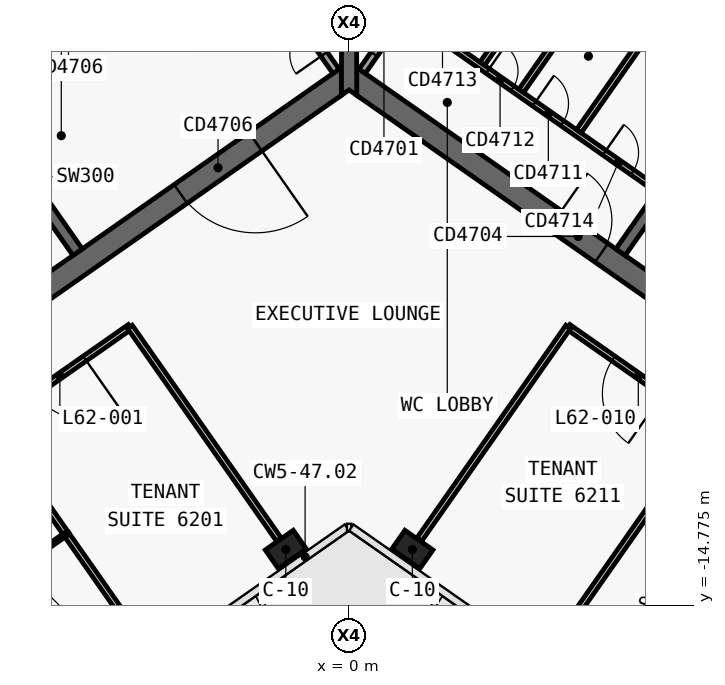
"""IFC4 building model, lengths in metres.
Left out: names, types, materials, properties, quantities, classifications, styles, units other than length and angle.
Written with IfcOpenShell. Run it as: python <this file> out.ifc"""

import sys

from ifc_helpers import new_model, si_unit, direction, frame, frame_2d, origin, origin_2d, place, context, subcontext, project, spatial, polyline, rectangle, outline, extrude, element, fill, save


model = new_model("IFC4")
c1 = context("Model", 3, precision=1e-05, world=origin(), true_north=direction((0.0, 1.0)))
c2 = subcontext(c1, "Body", "Model", "MODEL_VIEW")
j1 = project(units=[si_unit("LENGTHUNIT", "METRE"), si_unit("PLANEANGLEUNIT", "RADIAN")], contexts=[c1])
p1 = place(None, origin())
s1 = spatial("IfcSite", under=j1, at=p1, CompositionType="ELEMENT")
p2 = place(p1, origin())
s2 = spatial("IfcBuilding", under=s1, at=p2, CompositionType="ELEMENT")
p3 = place(p2, frame((0.0, 0.0, 264.4)))
s3 = spatial("IfcBuildingStorey", under=s2, at=p3, CompositionType="ELEMENT", Elevation=264.4)
p4 = place(p3, frame((-0.028, 12.066, 0.0), z_axis=(0.0, 0.0, 1.0), x_axis=(-0.819151382952, -0.573577380837, 0.0)))
e1 = element("IfcWall", 1, at=p4, inside=s3, PredefinedType="SHEAR", context=c2, shape_type="SweptSolid", body=[
    extrude(outline(polyline([(33.898, 0.3), (0.42, 0.3), (0.0, -0.3), (33.898, -0.3), (33.898, 0.3)])), origin(), (0.0, 0.0, 1.0), 3.9),
])
p5 = place(p3, frame((-0.028, -0.874, 0.0), z_axis=(0.0, 0.0, 1.0), x_axis=(-0.819150035022, -0.573579305871, 0.0)))
e2 = element("IfcWall", 2, at=p5, inside=s3, PredefinedType="SHEAR", context=c2, shape_type="SweptSolid", body=[
    extrude(outline(polyline([(26.476, 0.3), (0.42, 0.3), (0.0, -0.3), (26.476, -0.3), (26.476, 0.3)])), origin(), (0.0, 0.0, 1.0), 3.9),
])
p6 = place(p5, frame((2.976, 0.0, 0.0)))
e3 = element("IfcOpeningElement", 3, at=p6, cuts=e2, PredefinedType="OPENING", context=c2, shape_type="SweptSolid", body=[
    extrude(rectangle(XDim=2.4, YDim=2.1, at=frame_2d((1.2, 1.05))), frame((0.0, 0.31, 0.0), z_axis=(0.0, -1.0, 0.0), x_axis=(1.0, 0.0, 0.0)), (0.0, 0.0, 1.0), 0.62),
])
p7 = place(p5, frame((11.776, 0.0, 0.0)))
e4 = element("IfcOpeningElement", 4, at=p7, cuts=e2, PredefinedType="OPENING", context=c2, shape_type="SweptSolid", body=[
    extrude(rectangle(XDim=2.4, YDim=2.1, at=frame_2d((1.2, 1.05))), frame((0.0, 0.31, 0.0), z_axis=(0.0, -1.0, 0.0), x_axis=(1.0, 0.0, 0.0)), (0.0, 0.0, 1.0), 0.62),
])
p8 = place(p3, frame((-7.143, -5.49, 0.0), z_axis=(0.0, 0.0, 1.0), x_axis=(-0.573617744349, 0.819123118565, 0.0)))
e5 = element("IfcWall", 5, at=p8, inside=s3, PredefinedType="SHEAR", context=c2, shape_type="SweptSolid", body=[
    extrude(outline(polyline([(4.85, 0.15), (0.0, 0.15), (0.0, -0.15), (4.85, -0.15), (4.85, 0.15)])), origin(), (0.0, 0.0, 1.0), 3.9),
])
p9 = place(p3, frame((-2.638, 3.768, 0.0), z_axis=(0.0, 0.0, 1.0), x_axis=(-0.819155014212, -0.573572194837, 0.0)))
e6 = element("IfcWall", 6, at=p9, inside=s3, PredefinedType="SHEAR", context=c2, shape_type="SweptSolid", body=[
    extrude(outline(polyline([(26.4, 0.15), (0.0, 0.15), (0.0, -0.15), (26.4, -0.15), (26.4, 0.15)])), origin(), (0.0, 0.0, 1.0), 3.9),
])
p10 = place(p9, frame((1.169, 0.0, 0.0)))
e7 = element("IfcOpeningElement", 7, at=p10, cuts=e6, PredefinedType="OPENING", context=c2, shape_type="SweptSolid", body=[
    extrude(rectangle(XDim=1.1, YDim=2.1, at=frame_2d((0.55, 1.05))), frame((0.0, 0.16, 0.0), z_axis=(0.0, -1.0, 0.0), x_axis=(1.0, 0.0, 0.0)), (0.0, 0.0, 1.0), 0.32),
])
p11 = place(p9, frame((3.206, 0.0, 0.0)))
e8 = element("IfcOpeningElement", 8, at=p11, cuts=e6, PredefinedType="OPENING", context=c2, shape_type="SweptSolid", body=[
    extrude(rectangle(XDim=1.1, YDim=2.1, at=frame_2d((0.55, 1.05))), frame((0.0, 0.16, 0.0), z_axis=(0.0, -1.0, 0.0), x_axis=(1.0, 0.0, 0.0)), (0.0, 0.0, 1.0), 0.32),
])
p12 = place(p9, frame((5.244, 0.0, 0.0)))
e9 = element("IfcOpeningElement", 9, at=p12, cuts=e6, PredefinedType="OPENING", context=c2, shape_type="SweptSolid", body=[
    extrude(rectangle(XDim=1.1, YDim=2.1, at=frame_2d((0.55, 1.05))), frame((0.0, 0.16, 0.0), z_axis=(0.0, -1.0, 0.0), x_axis=(1.0, 0.0, 0.0)), (0.0, 0.0, 1.0), 0.32),
])
p13 = place(p9, frame((7.281, 0.0, 0.0)))
e10 = element("IfcOpeningElement", 10, at=p13, cuts=e6, PredefinedType="OPENING", context=c2, shape_type="SweptSolid", body=[
    extrude(rectangle(XDim=1.1, YDim=2.1, at=frame_2d((0.55, 1.05))), frame((0.0, 0.16, 0.0), z_axis=(0.0, -1.0, 0.0), x_axis=(1.0, 0.0, 0.0)), (0.0, 0.0, 1.0), 0.32),
])
p14 = place(p9, frame((9.688, 0.0, 0.0)))
e11 = element("IfcOpeningElement", 11, at=p14, cuts=e6, PredefinedType="OPENING", context=c2, shape_type="SweptSolid", body=[
    extrude(rectangle(XDim=1.1, YDim=2.1, at=frame_2d((0.55, 1.05))), frame((0.0, 0.16, 0.0), z_axis=(0.0, -1.0, 0.0), x_axis=(1.0, 0.0, 0.0)), (0.0, 0.0, 1.0), 0.32),
])
p15 = place(p9, frame((11.863, 0.0, 0.0)))
e12 = element("IfcOpeningElement", 12, at=p15, cuts=e6, PredefinedType="OPENING", context=c2, shape_type="SweptSolid", body=[
    extrude(rectangle(XDim=1.1, YDim=2.1, at=frame_2d((0.55, 1.05))), frame((0.0, 0.16, 0.0), z_axis=(0.0, -1.0, 0.0), x_axis=(1.0, 0.0, 0.0)), (0.0, 0.0, 1.0), 0.32),
])
p16 = place(p9, frame((14.552, 0.0, 0.0)))
e13 = element("IfcOpeningElement", 13, at=p16, cuts=e6, PredefinedType="OPENING", context=c2, shape_type="SweptSolid", body=[
    extrude(rectangle(XDim=1.0, YDim=2.1, at=frame_2d((0.5, 1.05))), frame((0.0, 0.16, 0.0), z_axis=(0.0, -1.0, 0.0), x_axis=(1.0, 0.0, 0.0)), (0.0, 0.0, 1.0), 0.32),
])
p17 = place(p9, frame((16.627, 0.0, 0.0)))
e14 = element("IfcOpeningElement", 14, at=p17, cuts=e6, PredefinedType="OPENING", context=c2, shape_type="SweptSolid", body=[
    extrude(rectangle(XDim=1.0, YDim=2.1, at=frame_2d((0.5, 1.05))), frame((0.0, 0.16, 0.0), z_axis=(0.0, -1.0, 0.0), x_axis=(1.0, 0.0, 0.0)), (0.0, 0.0, 1.0), 0.32),
])
p18 = place(p3, frame((0.028, 12.066, 0.0), z_axis=(0.0, 0.0, 1.0), x_axis=(0.819151382952, -0.573577380837, 0.0)))
e15 = element("IfcWall", 15, at=p18, inside=s3, PredefinedType="SHEAR", context=c2, shape_type="SweptSolid", body=[
    extrude(outline(polyline([(33.898, 0.3), (0.0, 0.3), (0.42, -0.3), (33.898, -0.3), (33.898, 0.3)])), origin(), (0.0, 0.0, 1.0), 3.9),
])
p19 = place(p3, frame((0.028, -0.874, 0.0), z_axis=(0.0, 0.0, 1.0), x_axis=(0.819150035022, -0.573579305871, 0.0)))
e16 = element("IfcWall", 16, at=p19, inside=s3, PredefinedType="SHEAR", context=c2, shape_type="SweptSolid", body=[
    extrude(outline(polyline([(26.476, 0.3), (0.0, 0.3), (0.42, -0.3), (26.476, -0.3), (26.476, 0.3)])), origin(), (0.0, 0.0, 1.0), 3.9),
])
p20 = place(p19, frame((6.576, 0.0, 0.0)))
e17 = element("IfcOpeningElement", 17, at=p20, cuts=e16, PredefinedType="OPENING", context=c2, shape_type="SweptSolid", body=[
    extrude(rectangle(XDim=1.5, YDim=2.1, at=frame_2d((0.75, 1.05))), frame((0.0, 0.31, 0.0), z_axis=(0.0, -1.0, 0.0), x_axis=(1.0, 0.0, 0.0)), (0.0, 0.0, 1.0), 0.62),
])
p21 = place(p19, frame((12.226, 0.0, 0.0)))
e18 = element("IfcOpeningElement", 18, at=p21, cuts=e16, PredefinedType="OPENING", context=c2, shape_type="SweptSolid", body=[
    extrude(rectangle(XDim=1.5, YDim=2.1, at=frame_2d((0.75, 1.05))), frame((0.0, 0.31, 0.0), z_axis=(0.0, -1.0, 0.0), x_axis=(1.0, 0.0, 0.0)), (0.0, 0.0, 1.0), 0.62),
])
p22 = place(p3, frame((7.143, -5.49, 0.0), z_axis=(0.0, 0.0, 1.0), x_axis=(0.573617744349, 0.819123118565, 0.0)))
e19 = element("IfcWall", 19, at=p22, inside=s3, PredefinedType="SHEAR", context=c2, shape_type="SweptSolid", body=[
    extrude(outline(polyline([(0.0, 0.15), (0.0, -0.15), (4.85, -0.15), (4.85, 0.15), (0.0, 0.15)])), origin(), (0.0, 0.0, 1.0), 3.9),
])
p23 = place(p3, frame((2.638, 3.768, 0.0), z_axis=(0.0, 0.0, 1.0), x_axis=(0.819155014212, -0.573572194837, 0.0)))
e20 = element("IfcWall", 20, at=p23, inside=s3, PredefinedType="SHEAR", context=c2, shape_type="SweptSolid", body=[
    extrude(outline(polyline([(0.0, 0.15), (0.0, -0.15), (26.4, -0.15), (26.4, 0.15), (0.0, 0.15)])), origin(), (0.0, 0.0, 1.0), 3.9),
])
p24 = place(p23, frame((9.637, 0.0, 0.0)))
e21 = element("IfcOpeningElement", 21, at=p24, cuts=e20, PredefinedType="OPENING", context=c2, shape_type="SweptSolid", body=[
    extrude(rectangle(XDim=1.2, YDim=2.1, at=frame_2d((0.6, 1.05))), frame((0.0, 0.16, 0.0), z_axis=(0.0, -1.0, 0.0), x_axis=(1.0, 0.0, 0.0)), (0.0, 0.0, 1.0), 0.32),
])
p25 = place(p23, frame((11.812, 0.0, 0.0)))
e22 = element("IfcOpeningElement", 22, at=p25, cuts=e20, PredefinedType="OPENING", context=c2, shape_type="SweptSolid", body=[
    extrude(rectangle(XDim=1.2, YDim=2.1, at=frame_2d((0.6, 1.05))), frame((0.0, 0.16, 0.0), z_axis=(0.0, -1.0, 0.0), x_axis=(1.0, 0.0, 0.0)), (0.0, 0.0, 1.0), 0.32),
])
p26 = place(p23, frame((13.988, 0.0, 0.0)))
e23 = element("IfcOpeningElement", 23, at=p26, cuts=e20, PredefinedType="OPENING", context=c2, shape_type="SweptSolid", body=[
    extrude(rectangle(XDim=1.2, YDim=2.1, at=frame_2d((0.6, 1.05))), frame((0.0, 0.16, 0.0), z_axis=(0.0, -1.0, 0.0), x_axis=(1.0, 0.0, 0.0)), (0.0, 0.0, 1.0), 0.32),
])
p27 = place(p23, frame((16.262, 0.0, 0.0)))
e24 = element("IfcOpeningElement", 24, at=p27, cuts=e20, PredefinedType="OPENING", context=c2, shape_type="SweptSolid", body=[
    extrude(rectangle(XDim=1.0, YDim=2.1, at=frame_2d((0.5, 1.05))), frame((0.0, 0.16, 0.0), z_axis=(0.0, -1.0, 0.0), x_axis=(1.0, 0.0, 0.0)), (0.0, 0.0, 1.0), 0.32),
])
p28 = place(p3, frame((0.0, -1.361, 0.0), z_axis=(0.0, 0.0, 1.0), x_axis=(0.0, 1.0, 0.0)))
e25 = element("IfcWall", 25, at=p28, inside=s3, PredefinedType="SHEAR", context=c2, shape_type="SweptSolid", body=[
    extrude(outline(polyline([(0.14, 0.2), (0.0, 0.2), (0.14, 0.0), (0.0, -0.2), (0.14, -0.2), (1.012, -0.2), (12.94, -0.2), (13.813, -0.2), (13.893, -0.2), (13.933, -0.172), (13.813, 0.0), (13.933, 0.172), (13.893, 0.2), (13.813, 0.2), (12.94, 0.2), (1.012, 0.2), (0.14, 0.2)])), origin(), (0.0, 0.0, 1.0), 3.9),
])
for number, where, z_axis, x_axis in (
    (26, (-1.665, -13.313, 0.0), (0.0, 0.0, 1.0), (-0.819, -0.574, 0.0)),
    (27, (1.665, -13.313, 0.0), (0.0, 0.0, 1.0), (0.819, -0.574, 0.0)),
):
    element("IfcColumn", number, at=place(p3, frame(where, z_axis=z_axis, x_axis=x_axis)), inside=s3, PredefinedType="COLUMN", context=c2, shape_type="SweptSolid", body=[
        extrude(rectangle(XDim=0.9, YDim=0.6, at=origin_2d()), origin(), (0.0, 0.0, 1.0), 3.9),
    ])
p29 = place(p3, frame((1.516, 0.77, 0.0), z_axis=(0.0, 0.0, 1.0), x_axis=(0.819146424436, -0.573584462249, 0.0)))
e28 = element("IfcWall", 28, at=p29, inside=s3, PredefinedType="PARTITIONING", context=c2, shape_type="SweptSolid", body=[
    extrude(rectangle(XDim=8.05, YDim=0.15, at=frame_2d((4.025, 0.0))), origin(), (0.0, 0.0, 1.0), 3.62),
])
p30 = place(p29, frame((0.7, 0.0, 0.0)))
e29 = element("IfcOpeningElement", 29, at=p30, cuts=e28, PredefinedType="OPENING", context=c2, shape_type="SweptSolid", body=[
    extrude(rectangle(XDim=0.9, YDim=2.1, at=frame_2d((0.45, 1.05))), frame((0.0, 0.085, 0.0), z_axis=(0.0, -1.0, 0.0), x_axis=(1.0, 0.0, 0.0)), (0.0, 0.0, 1.0), 0.17),
])
p31 = place(p29, frame((2.6, 0.0, 0.0)))
e30 = element("IfcOpeningElement", 30, at=p31, cuts=e28, PredefinedType="OPENING", context=c2, shape_type="SweptSolid", body=[
    extrude(rectangle(XDim=0.8, YDim=2.1, at=frame_2d((0.4, 1.05))), frame((0.0, 0.085, 0.0), z_axis=(0.0, -1.0, 0.0), x_axis=(1.0, 0.0, 0.0)), (0.0, 0.0, 1.0), 0.17),
])
p32 = place(p29, frame((4.1, 0.0, 0.0)))
e31 = element("IfcOpeningElement", 31, at=p32, cuts=e28, PredefinedType="OPENING", context=c2, shape_type="SweptSolid", body=[
    extrude(rectangle(XDim=0.9, YDim=2.1, at=frame_2d((0.45, 1.05))), frame((0.0, 0.085, 0.0), z_axis=(0.0, -1.0, 0.0), x_axis=(1.0, 0.0, 0.0)), (0.0, 0.0, 1.0), 0.17),
])
p33 = place(p29, frame((6.35, 0.0, 0.0)))
e32 = element("IfcOpeningElement", 32, at=p33, cuts=e28, PredefinedType="OPENING", context=c2, shape_type="SweptSolid", body=[
    extrude(rectangle(XDim=0.9, YDim=2.1, at=frame_2d((0.45, 1.05))), frame((0.0, 0.085, 0.0), z_axis=(0.0, -1.0, 0.0), x_axis=(1.0, 0.0, 0.0)), (0.0, 0.0, 1.0), 0.17),
])
p34 = place(p3, frame((3.504, -0.531, 0.0), z_axis=(0.0, 0.0, 1.0), x_axis=(0.573582013179, 0.819148139324, 0.0)))
e33 = element("IfcWall", 33, at=p34, inside=s3, PredefinedType="PARTITIONING", context=c2, shape_type="SweptSolid", body=[
    extrude(rectangle(XDim=2.875, YDim=0.15, at=frame_2d((1.438, 0.0))), origin(), (0.0, 0.0, 1.0), 3.62),
])
p35 = place(p3, frame((4.528, -1.248, 0.0), z_axis=(0.0, 0.0, 1.0), x_axis=(0.573621911162, 0.819120200602, 0.0)))
e34 = element("IfcWall", 34, at=p35, inside=s3, PredefinedType="PARTITIONING", context=c2, shape_type="SweptSolid", body=[
    extrude(rectangle(XDim=2.875, YDim=0.15, at=frame_2d((1.438, 0.0))), origin(), (0.0, 0.0, 1.0), 3.62),
])
p36 = place(p3, frame((6.044, -2.309, 0.0), z_axis=(0.0, 0.0, 1.0), x_axis=(0.573564930514, 0.819160100642, 0.0)))
e35 = element("IfcWall", 35, at=p36, inside=s3, PredefinedType="PARTITIONING", context=c2, shape_type="SweptSolid", body=[
    extrude(rectangle(XDim=2.875, YDim=0.15, at=frame_2d((1.438, 0.0))), origin(), (0.0, 0.0, 1.0), 3.62),
])
p37 = place(p3, frame((-0.344, -0.729, 0.0), z_axis=(0.0, 0.0, 1.0), x_axis=(-0.573560315113, 0.819163332265, 0.0)))
e36 = element("IfcWall", 36, at=p37, inside=s3, PredefinedType="SOLIDWALL", context=c2, shape_type="SweptSolid", body=[
    extrude(rectangle(XDim=4.85, YDim=0.2, at=frame_2d((2.425, 0.0))), origin(), (0.0, 0.0, 1.0), 3.62),
])
p38 = place(p37, frame((0.55, 0.0, 0.0)))
e37 = element("IfcOpeningElement", 37, at=p38, cuts=e36, PredefinedType="OPENING", context=c2, shape_type="SweptSolid", body=[
    extrude(rectangle(XDim=0.9, YDim=2.1, at=frame_2d((0.45, 1.05))), frame((0.0, 0.11, 0.0), z_axis=(0.0, -1.0, 0.0), x_axis=(1.0, 0.0, 0.0)), (0.0, 0.0, 1.0), 0.22),
])
p39 = place(p3, frame((0.344, -0.729, 0.0), z_axis=(0.0, 0.0, 1.0), x_axis=(0.573560315113, 0.819163332265, 0.0)))
e38 = element("IfcWall", 38, at=p39, inside=s3, PredefinedType="SOLIDWALL", context=c2, shape_type="SweptSolid", body=[
    extrude(rectangle(XDim=4.85, YDim=0.2, at=frame_2d((2.425, 0.0))), origin(), (0.0, 0.0, 1.0), 3.62),
])
p40 = place(p39, frame((0.55, 0.0, 0.0)))
e39 = element("IfcOpeningElement", 39, at=p40, cuts=e38, PredefinedType="OPENING", context=c2, shape_type="SweptSolid", body=[
    extrude(rectangle(XDim=0.9, YDim=2.1, at=frame_2d((0.45, 1.05))), frame((0.0, 0.11, 0.0), z_axis=(0.0, -1.0, 0.0), x_axis=(1.0, 0.0, 0.0)), (0.0, 0.0, 1.0), 0.22),
])
p41 = place(p3, frame((9.454, -10.038, 0.0), z_axis=(0.0, 0.0, 1.0), x_axis=(-0.819142740634, 0.573589723117, 0.0)))
e40 = element("IfcWall", 40, at=p41, inside=s3, PredefinedType="PARTITIONING", context=c2, shape_type="SweptSolid", body=[
    extrude(rectangle(XDim=4.502, YDim=0.15, at=frame_2d((2.251, 0.0))), origin(), (0.0, 0.0, 1.0), 3.05),
])
p42 = place(p41, frame((1.451, 0.0, 0.0)))
e41 = element("IfcOpeningElement", 41, at=p42, cuts=e40, PredefinedType="OPENING", context=c2, shape_type="SweptSolid", body=[
    extrude(rectangle(XDim=1.6, YDim=2.1, at=frame_2d((0.8, 1.05))), frame((0.0, 0.085, 0.0), z_axis=(0.0, -1.0, 0.0), x_axis=(1.0, 0.0, 0.0)), (0.0, 0.0, 1.0), 0.17),
])
p43 = place(p3, frame((-5.766, -7.456, 0.0), z_axis=(0.0, 0.0, 1.0), x_axis=(-0.819142740634, -0.573589723117, 0.0)))
e42 = element("IfcWall", 42, at=p43, inside=s3, PredefinedType="PARTITIONING", context=c2, shape_type="SweptSolid", body=[
    extrude(rectangle(XDim=4.502, YDim=0.15, at=frame_2d((2.251, 0.0))), origin(), (0.0, 0.0, 1.0), 3.05),
])
p44 = place(p43, frame((1.451, 0.0, 0.0)))
e43 = element("IfcOpeningElement", 43, at=p44, cuts=e42, PredefinedType="OPENING", context=c2, shape_type="SweptSolid", body=[
    extrude(rectangle(XDim=1.6, YDim=2.1, at=frame_2d((0.8, 1.05))), frame((0.0, 0.085, 0.0), z_axis=(0.0, -1.0, 0.0), x_axis=(1.0, 0.0, 0.0)), (0.0, 0.0, 1.0), 0.17),
])
p45 = place(p3, frame((9.452, -10.037, 0.0), z_axis=(0.0, 0.0, 1.0), x_axis=(-0.573575945067, -0.81915238829, 0.0)))
e44 = element("IfcWall", 44, at=p45, inside=s3, PredefinedType="PARTITIONING", context=c2, shape_type="SweptSolid", body=[
    extrude(rectangle(XDim=7.5, YDim=0.15, at=frame_2d((3.75, 0.0))), origin(), (0.0, 0.0, 1.0), 3.0),
])
p46 = place(p3, frame((1.849, -13.051, 0.0), z_axis=(0.0, 0.0, 1.0), x_axis=(0.573577493031, 0.819151304393, 0.0)))
e45 = element("IfcWall", 45, at=p46, inside=s3, PredefinedType="PARTITIONING", context=c2, shape_type="SweptSolid", body=[
    extrude(rectangle(XDim=6.83, YDim=0.15, at=frame_2d((3.415, 0.0))), origin(), (0.0, 0.0, 1.0), 3.05),
])
p47 = place(p3, frame((-1.849, -13.051, 0.0), z_axis=(0.0, 0.0, 1.0), x_axis=(-0.57357985571, 0.819149650018, 0.0)))
e46 = element("IfcWall", 46, at=p47, inside=s3, PredefinedType="PARTITIONING", context=c2, shape_type="SweptSolid", body=[
    extrude(rectangle(XDim=6.832, YDim=0.15, at=frame_2d((3.416, 0.0))), origin(), (0.0, 0.0, 1.0), 3.05),
])
p48 = place(p3, frame((-5.151, -16.18, 0.0), z_axis=(0.0, 0.0, 1.0), x_axis=(-0.573593387921, 0.81914017441, 0.0)))
e47 = element("IfcWall", 47, at=p48, inside=s3, PredefinedType="PARTITIONING", context=c2, shape_type="SweptSolid", body=[
    extrude(rectangle(XDim=4.001, YDim=0.15, at=frame_2d((2.0, 0.0))), origin(), (0.0, 0.0, 1.0), 3.0),
])
p49 = place(p3, frame((-7.444, -12.906, 0.0), z_axis=(0.0, 0.0, 1.0), x_axis=(-0.573555919535, 0.819166409935, 0.0)))
e48 = element("IfcWall", 48, at=p49, inside=s3, PredefinedType="PARTITIONING", context=c2, shape_type="SweptSolid", body=[
    extrude(rectangle(XDim=3.502, YDim=0.15, at=frame_2d((1.751, 0.0))), origin(), (0.0, 0.0, 1.0), 3.62),
])
p50 = place(p3, frame((-7.444, -12.905, 0.0), z_axis=(0.0, 0.0, 1.0), x_axis=(-0.819155448096, -0.573571575181, 0.0)))
e49 = element("IfcWall", 49, at=p50, inside=s3, PredefinedType="PARTITIONING", context=c2, shape_type="SweptSolid", body=[
    extrude(rectangle(XDim=10.5, YDim=0.1, at=frame_2d((5.25, 0.0))), origin(), (0.0, 0.0, 1.0), 3.05),
])
p51 = place(p50, frame((4.8, 0.0, 0.0)))
e50 = element("IfcOpeningElement", 50, at=p51, cuts=e49, PredefinedType="OPENING", context=c2, shape_type="SweptSolid", body=[
    extrude(rectangle(XDim=0.9, YDim=2.1, at=frame_2d((0.45, 1.05))), frame((0.0, 0.06, 0.0), z_axis=(0.0, -1.0, 0.0), x_axis=(1.0, 0.0, 0.0)), (0.0, 0.0, 1.0), 0.12),
])
p52 = place(p6, origin())
e51 = element("IfcDoor", 51, at=p52, inside=s3, OperationType="DOUBLE_DOOR_SINGLE_SWING", PredefinedType="DOOR", context=c2, shape_type="SweptSolid", body=[
    extrude(rectangle(XDim=2.4, YDim=2.1, at=frame_2d((1.2, 1.05))), frame((0.0, 0.025, 0.0), z_axis=(0.0, -1.0, 0.0), x_axis=(1.0, 0.0, 0.0)), (0.0, 0.0, 1.0), 0.05),
])
fill(e3, e51)
p53 = place(p31, origin())
e52 = element("IfcDoor", 52, at=p53, inside=s3, OperationType="SINGLE_SWING_RIGHT", PredefinedType="DOOR", context=c2, shape_type="SweptSolid", body=[
    extrude(rectangle(XDim=0.8, YDim=2.1, at=frame_2d((0.4, 1.05))), frame((0.0, 0.025, 0.0), z_axis=(0.0, -1.0, 0.0), x_axis=(1.0, 0.0, 0.0)), (0.0, 0.0, 1.0), 0.05),
])
fill(e30, e52)
p54 = place(p32, origin())
e53 = element("IfcDoor", 53, at=p54, inside=s3, OperationType="SINGLE_SWING_RIGHT", PredefinedType="DOOR", context=c2, shape_type="SweptSolid", body=[
    extrude(rectangle(XDim=0.9, YDim=2.1, at=frame_2d((0.45, 1.05))), frame((0.0, 0.025, 0.0), z_axis=(0.0, -1.0, 0.0), x_axis=(1.0, 0.0, 0.0)), (0.0, 0.0, 1.0), 0.05),
])
fill(e31, e53)
p55 = place(p33, origin())
e54 = element("IfcDoor", 54, at=p55, inside=s3, OperationType="SINGLE_SWING_RIGHT", PredefinedType="DOOR", context=c2, shape_type="SweptSolid", body=[
    extrude(rectangle(XDim=0.9, YDim=2.1, at=frame_2d((0.45, 1.05))), frame((0.0, 0.025, 0.0), z_axis=(0.0, -1.0, 0.0), x_axis=(1.0, 0.0, 0.0)), (0.0, 0.0, 1.0), 0.05),
])
fill(e32, e54)
p56 = place(p20, origin())
e55 = element("IfcDoor", 55, at=p56, inside=s3, OperationType="SINGLE_SWING_RIGHT", PredefinedType="DOOR", context=c2, shape_type="SweptSolid", body=[
    extrude(rectangle(XDim=1.5, YDim=2.1, at=frame_2d((0.75, 1.05))), frame((0.0, 0.025, 0.0), z_axis=(0.0, -1.0, 0.0), x_axis=(1.0, 0.0, 0.0)), (0.0, 0.0, 1.0), 0.05),
])
fill(e17, e55)
p57 = place(p38, origin())
e56 = element("IfcDoor", 56, at=p57, inside=s3, OperationType="SINGLE_SWING_RIGHT", PredefinedType="DOOR", context=c2, shape_type="SweptSolid", body=[
    extrude(rectangle(XDim=0.9, YDim=2.1, at=frame_2d((0.45, 1.05))), frame((0.0, 0.025, 0.0), z_axis=(0.0, -1.0, 0.0), x_axis=(1.0, 0.0, 0.0)), (0.0, 0.0, 1.0), 0.05),
])
fill(e37, e56)
p58 = place(p40, origin())
e57 = element("IfcDoor", 57, at=p58, inside=s3, OperationType="SINGLE_SWING_RIGHT", PredefinedType="DOOR", context=c2, shape_type="SweptSolid", body=[
    extrude(rectangle(XDim=0.9, YDim=2.1, at=frame_2d((0.45, 1.05))), frame((0.0, 0.025, 0.0), z_axis=(0.0, -1.0, 0.0), x_axis=(1.0, 0.0, 0.0)), (0.0, 0.0, 1.0), 0.05),
])
fill(e39, e57)
p59 = place(p44, origin())
e58 = element("IfcDoor", 58, at=p59, inside=s3, OperationType="DOUBLE_DOOR_SINGLE_SWING", PredefinedType="DOOR", context=c2, shape_type="SweptSolid", body=[
    extrude(rectangle(XDim=1.6, YDim=2.1, at=frame_2d((0.8, 1.05))), frame((0.0, 0.025, 0.0), z_axis=(0.0, -1.0, 0.0), x_axis=(1.0, 0.0, 0.0)), (0.0, 0.0, 1.0), 0.05),
])
fill(e43, e58)
p60 = place(p42, origin())
e59 = element("IfcDoor", 59, at=p60, inside=s3, OperationType="DOUBLE_DOOR_SINGLE_SWING", PredefinedType="DOOR", context=c2, shape_type="SweptSolid", body=[
    extrude(rectangle(XDim=1.6, YDim=2.1, at=frame_2d((0.8, 1.05))), frame((0.0, 0.025, 0.0), z_axis=(0.0, -1.0, 0.0), x_axis=(1.0, 0.0, 0.0)), (0.0, 0.0, 1.0), 0.05),
])
fill(e41, e59)
save(model, sys.argv[1])
